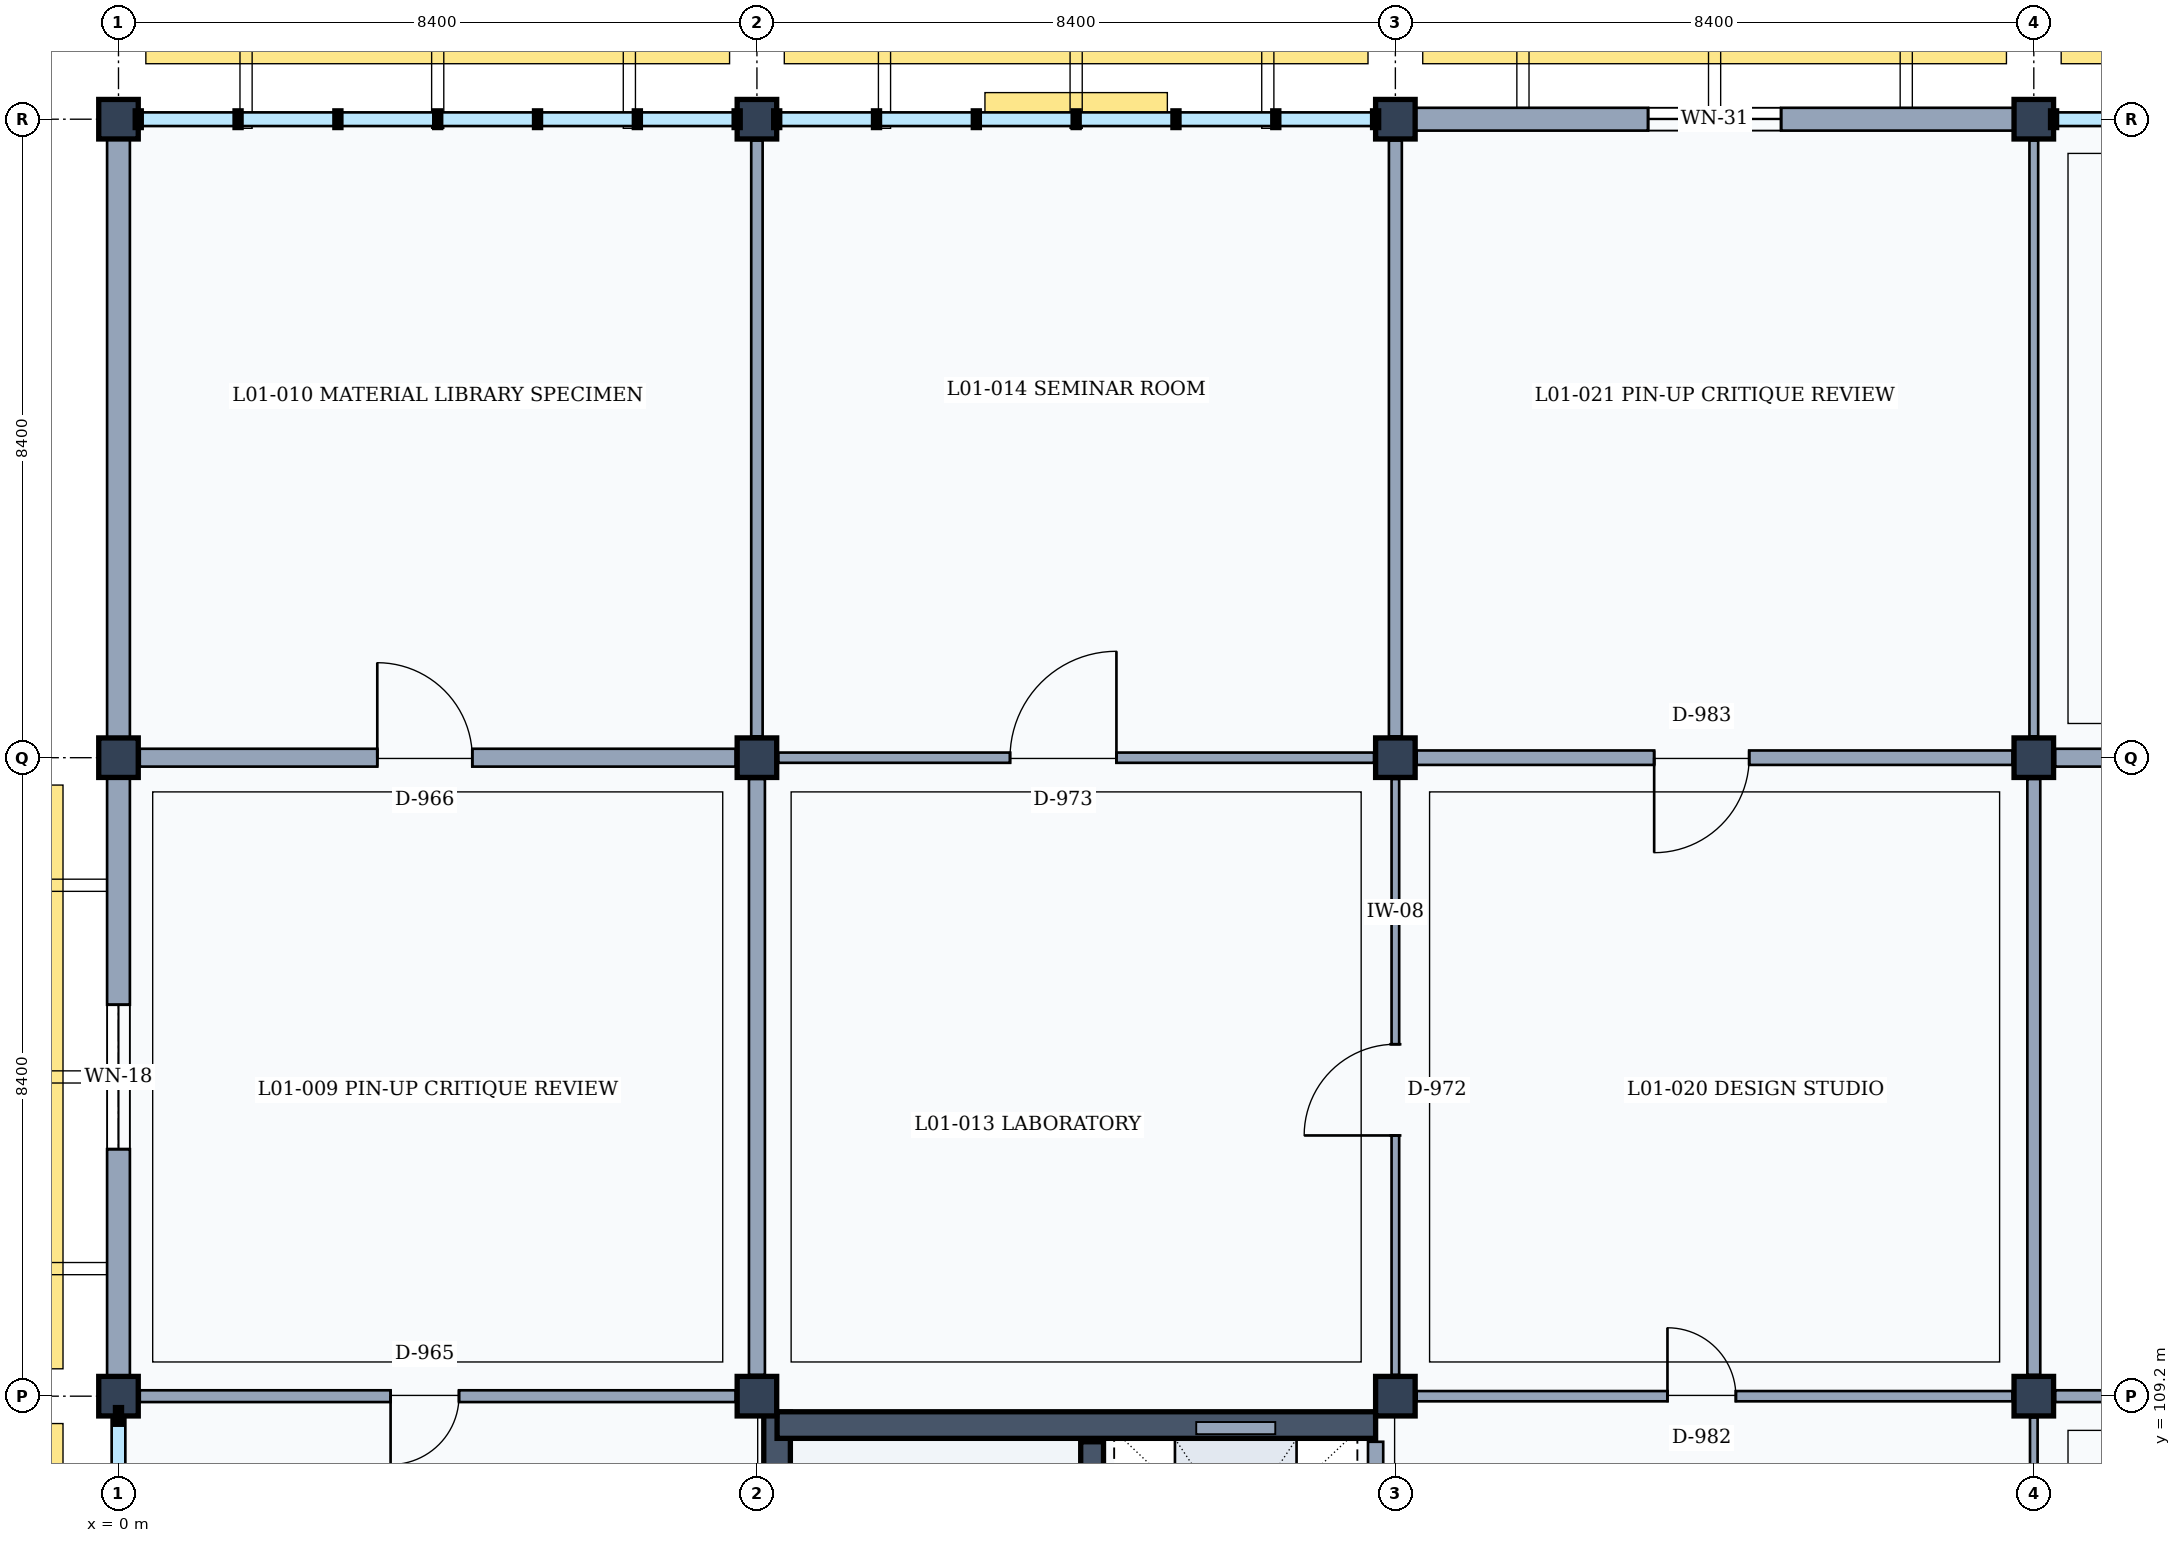
"""IFC4 building model, lengths in metres.
Left out: names, types, materials, properties, quantities, classifications, styles, units other than length and angle.
Written with IfcOpenShell. Run it as: python <this file> out.ifc"""

import sys

from ifc_helpers import new_model, si_unit, direction, frame, frame_2d, origin, origin_2d, place, context, subcontext, project, spatial, rectangle, extrude, element, fill, save


model = new_model("IFC4")
c1 = context("Model", 3, precision=1e-05, world=origin(), true_north=direction((0.0, 1.0)))
c2 = subcontext(c1, "Body", "Model", "MODEL_VIEW")
j1 = project(units=[si_unit("LENGTHUNIT", "METRE"), si_unit("PLANEANGLEUNIT", "RADIAN")], contexts=[c1])
p1 = place(None, origin())
s1 = spatial("IfcSite", under=j1, at=p1, CompositionType="ELEMENT")
p2 = place(p1, origin())
s2 = spatial("IfcBuilding", under=s1, at=p2, CompositionType="ELEMENT")
p3 = place(p2, frame((0.0, 0.0, 4.8)))
s3 = spatial("IfcBuildingStorey", under=s2, at=p3, CompositionType="ELEMENT", Elevation=4.8)
for number, where, z_axis, x_axis in (
    (1, (0.0, 109.2, 0.0), (0.0, 0.0, 1.0), (1.0, 0.0, 0.0)),
    (2, (0.0, 117.6, 0.0), (0.0, 0.0, 1.0), (1.0, 0.0, 0.0)),
    (3, (0.0, 126.0, 0.0), (0.0, 0.0, 1.0), (1.0, 0.0, 0.0)),
    (4, (8.4, 109.2, 0.0), (0.0, 0.0, 1.0), (1.0, 0.0, 0.0)),
    (5, (8.4, 117.6, 0.0), (0.0, 0.0, 1.0), (1.0, 0.0, 0.0)),
    (6, (8.4, 126.0, 0.0), (0.0, 0.0, 1.0), (1.0, 0.0, 0.0)),
    (7, (16.8, 109.2, 0.0), (0.0, 0.0, 1.0), (1.0, 0.0, 0.0)),
    (8, (16.8, 117.6, 0.0), (0.0, 0.0, 1.0), (1.0, 0.0, 0.0)),
    (9, (16.8, 126.0, 0.0), (0.0, 0.0, 1.0), (1.0, 0.0, 0.0)),
    (10, (25.2, 109.2, 0.0), (0.0, 0.0, 1.0), (1.0, 0.0, 0.0)),
    (11, (25.2, 117.6, 0.0), (0.0, 0.0, 1.0), (1.0, 0.0, 0.0)),
    (12, (25.2, 126.0, 0.0), (0.0, 0.0, 1.0), (1.0, 0.0, 0.0)),
):
    element("IfcColumn", number, at=place(p3, frame(where, z_axis=z_axis, x_axis=x_axis)), inside=s3, PredefinedType="COLUMN", context=c2, shape_type="SweptSolid", body=[
        extrude(rectangle(XDim=0.52, YDim=0.52, at=origin_2d()), origin(), (0.0, 0.0, 1.0), 4.8),
    ])
p4 = place(p3, frame((0.0, 109.46, 0.0), z_axis=(0.0, 0.0, 1.0), x_axis=(0.0, 1.0, 0.0)))
e13 = element("IfcWall", 13, at=p4, inside=s3, PredefinedType="SOLIDWALL", context=c2, shape_type="SweptSolid", body=[
    extrude(rectangle(XDim=7.88, YDim=0.3, at=frame_2d((3.94, 0.0))), origin(), (0.0, 0.0, 1.0), 3.96),
])
p5 = place(p4, frame((2.99, 0.0, 0.9)))
e14 = element("IfcOpeningElement", 14, at=p5, cuts=e13, PredefinedType="OPENING", context=c2, shape_type="SweptSolid", body=[
    extrude(rectangle(XDim=1.9, YDim=2.05, at=frame_2d((0.95, 1.025))), frame((0.0, 0.16, 0.0), z_axis=(0.0, -1.0, 0.0), x_axis=(1.0, 0.0, 0.0)), (0.0, 0.0, 1.0), 0.32),
])
p6 = place(p3, frame((0.0, 117.86, 0.0), z_axis=(0.0, 0.0, 1.0), x_axis=(0.0, 1.0, 0.0)))
e15 = element("IfcWall", 15, at=p6, inside=s3, PredefinedType="SOLIDWALL", context=c2, shape_type="SweptSolid", body=[
    extrude(rectangle(XDim=7.88, YDim=0.3, at=frame_2d((3.94, 0.0))), origin(), (0.0, 0.0, 1.0), 3.96),
])
p7 = place(p3, frame((17.06, 126.0, 0.0), z_axis=(0.0, 0.0, 1.0), x_axis=(1.0, 0.0, 0.0)))
e16 = element("IfcWall", 16, at=p7, inside=s3, PredefinedType="SOLIDWALL", context=c2, shape_type="SweptSolid", body=[
    extrude(rectangle(XDim=7.88, YDim=0.3, at=frame_2d((3.94, 0.0))), origin(), (0.0, 0.0, 1.0), 3.96),
])
p8 = place(p7, frame((3.065, 0.0, 0.9)))
e17 = element("IfcOpeningElement", 17, at=p8, cuts=e16, PredefinedType="OPENING", context=c2, shape_type="SweptSolid", body=[
    extrude(rectangle(XDim=1.75, YDim=1.85, at=frame_2d((0.875, 0.925))), frame((0.0, 0.16, 0.0), z_axis=(0.0, -1.0, 0.0), x_axis=(1.0, 0.0, 0.0)), (0.0, 0.0, 1.0), 0.32),
])
p9 = place(p3, frame((8.665, 101.05, 0.0), z_axis=(0.0, 0.0, 1.0), x_axis=(0.0, 1.0, 0.0)))
e18 = element("IfcWall", 18, at=p9, inside=s3, PredefinedType="SHEAR", context=c2, shape_type="SweptSolid", body=[
    extrude(rectangle(XDim=7.94, YDim=0.35, at=frame_2d((3.97, 0.0))), origin(), (0.0, 0.0, 1.0), 4.56),
])
p10 = place(p3, frame((8.665, 108.82, 0.0), z_axis=(0.0, 0.0, 1.0), x_axis=(1.0, 0.0, 0.0)))
e19 = element("IfcWall", 19, at=p10, inside=s3, PredefinedType="SHEAR", context=c2, shape_type="SweptSolid", body=[
    extrude(rectangle(XDim=7.875, YDim=0.35, at=frame_2d((3.938, 0.0))), origin(), (0.0, 0.0, 1.0), 4.56),
])
p11 = place(p3, frame((16.54, 108.6, 0.0), z_axis=(0.0, 0.0, 1.0), x_axis=(0.0, -1.0, 0.0)))
e20 = element("IfcWall", 20, at=p11, inside=s3, PredefinedType="PARTITIONING", context=c2, shape_type="SweptSolid", body=[
    extrude(rectangle(XDim=7.2, YDim=0.2, at=frame_2d((3.6, 0.0))), origin(), (0.0, 0.0, 1.0), 3.92),
])
p12 = place(p11, frame((3.55, 0.0, 0.0)))
e21 = element("IfcOpeningElement", 21, at=p12, cuts=e20, PredefinedType="OPENING", context=c2, shape_type="SweptSolid", body=[
    extrude(rectangle(XDim=1.1, YDim=2.15, at=frame_2d((0.55, 1.075))), frame((0.0, 0.11, 0.0), z_axis=(0.0, -1.0, 0.0), x_axis=(1.0, 0.0, 0.0)), (0.0, 0.0, 1.0), 0.22),
])
p13 = place(p3, frame((12.81, 101.22, 0.0), z_axis=(0.0, 0.0, 1.0), x_axis=(0.0, 1.0, 0.0)))
e22 = element("IfcWall", 22, at=p13, inside=s3, PredefinedType="SHEAR", context=c2, shape_type="SweptSolid", body=[
    extrude(rectangle(XDim=7.38, YDim=0.3, at=frame_2d((3.69, 0.0))), origin(), (0.0, 0.0, 1.0), 4.56),
])
p14 = place(p13, frame((0.28, 0.0, 0.0)))
e23 = element("IfcOpeningElement", 23, at=p14, cuts=e22, PredefinedType="OPENING", context=c2, shape_type="SweptSolid", body=[
    extrude(rectangle(XDim=1.1, YDim=2.15, at=frame_2d((0.55, 1.075))), frame((0.0, 0.16, 0.0), z_axis=(0.0, -1.0, 0.0), x_axis=(1.0, 0.0, 0.0)), (0.0, 0.0, 1.0), 0.32),
])
p15 = place(p3, frame((0.28, 109.2, 0.0), z_axis=(0.0, 0.0, 1.0), x_axis=(1.0, 0.0, 0.0)))
e24 = element("IfcWall", 24, at=p15, inside=s3, PredefinedType="PARTITIONING", context=c2, shape_type="SweptSolid", body=[
    extrude(rectangle(XDim=7.84, YDim=0.155, at=frame_2d((3.92, 0.0))), origin(), (0.0, 0.0, 1.0), 3.92),
])
p16 = place(p15, frame((3.3, 0.0, 0.0)))
e25 = element("IfcOpeningElement", 25, at=p16, cuts=e24, PredefinedType="OPENING", context=c2, shape_type="SweptSolid", body=[
    extrude(rectangle(XDim=0.9, YDim=2.1, at=frame_2d((0.45, 1.05))), frame((0.0, 0.087, 0.0), z_axis=(0.0, -1.0, 0.0), x_axis=(1.0, 0.0, 0.0)), (0.0, 0.0, 1.0), 0.175),
])
p17 = place(p3, frame((8.4, 109.48, 0.0), z_axis=(0.0, 0.0, 1.0), x_axis=(0.0, 1.0, 0.0)))
e26 = element("IfcWall", 26, at=p17, inside=s3, PredefinedType="PARTITIONING", context=c2, shape_type="SweptSolid", body=[
    extrude(rectangle(XDim=7.84, YDim=0.21, at=frame_2d((3.92, 0.0))), origin(), (0.0, 0.0, 1.0), 3.92),
])
p18 = place(p3, frame((0.28, 117.6, 0.0), z_axis=(0.0, 0.0, 1.0), x_axis=(1.0, 0.0, 0.0)))
e27 = element("IfcWall", 27, at=p18, inside=s3, PredefinedType="PARTITIONING", context=c2, shape_type="SweptSolid", body=[
    extrude(rectangle(XDim=7.84, YDim=0.235, at=frame_2d((3.92, 0.0))), origin(), (0.0, 0.0, 1.0), 3.92),
])
p19 = place(p18, frame((3.125, 0.0, 0.0)))
e28 = element("IfcOpeningElement", 28, at=p19, cuts=e27, PredefinedType="OPENING", context=c2, shape_type="SweptSolid", body=[
    extrude(rectangle(XDim=1.25, YDim=2.3, at=frame_2d((0.625, 1.15))), frame((0.0, 0.127, 0.0), z_axis=(0.0, -1.0, 0.0), x_axis=(1.0, 0.0, 0.0)), (0.0, 0.0, 1.0), 0.255),
])
p20 = place(p3, frame((8.4, 117.88, 0.0), z_axis=(0.0, 0.0, 1.0), x_axis=(0.0, 1.0, 0.0)))
e29 = element("IfcWall", 29, at=p20, inside=s3, PredefinedType="PARTITIONING", context=c2, shape_type="SweptSolid", body=[
    extrude(rectangle(XDim=7.84, YDim=0.15, at=frame_2d((3.92, 0.0))), origin(), (0.0, 0.0, 1.0), 3.92),
])
p21 = place(p3, frame((16.8, 109.48, 0.0), z_axis=(0.0, 0.0, 1.0), x_axis=(0.0, 1.0, 0.0)))
e30 = element("IfcWall", 30, at=p21, inside=s3, PredefinedType="MOVABLE", context=c2, shape_type="SweptSolid", body=[
    extrude(rectangle(XDim=7.84, YDim=0.1, at=frame_2d((3.92, 0.0))), origin(), (0.0, 0.0, 1.0), 3.92),
])
p22 = place(p21, frame((3.15, 0.0, 0.0)))
e31 = element("IfcOpeningElement", 31, at=p22, cuts=e30, PredefinedType="OPENING", context=c2, shape_type="SweptSolid", body=[
    extrude(rectangle(XDim=1.2, YDim=2.2, at=frame_2d((0.6, 1.1))), frame((0.0, 0.06, 0.0), z_axis=(0.0, -1.0, 0.0), x_axis=(1.0, 0.0, 0.0)), (0.0, 0.0, 1.0), 0.12),
])
p23 = place(p3, frame((8.68, 117.6, 0.0), z_axis=(0.0, 0.0, 1.0), x_axis=(1.0, 0.0, 0.0)))
e32 = element("IfcWall", 32, at=p23, inside=s3, PredefinedType="PARTITIONING", context=c2, shape_type="SweptSolid", body=[
    extrude(rectangle(XDim=7.84, YDim=0.135, at=frame_2d((3.92, 0.0))), origin(), (0.0, 0.0, 1.0), 3.92),
])
p24 = place(p23, frame((3.05, 0.0, 0.0)))
e33 = element("IfcOpeningElement", 33, at=p24, cuts=e32, PredefinedType="OPENING", context=c2, shape_type="SweptSolid", body=[
    extrude(rectangle(XDim=1.4, YDim=2.25, at=frame_2d((0.7, 1.125))), frame((0.0, 0.077, 0.0), z_axis=(0.0, -1.0, 0.0), x_axis=(1.0, 0.0, 0.0)), (0.0, 0.0, 1.0), 0.155),
])
p25 = place(p3, frame((16.8, 117.88, 0.0), z_axis=(0.0, 0.0, 1.0), x_axis=(0.0, 1.0, 0.0)))
e34 = element("IfcWall", 34, at=p25, inside=s3, PredefinedType="PARTITIONING", context=c2, shape_type="SweptSolid", body=[
    extrude(rectangle(XDim=7.84, YDim=0.17, at=frame_2d((3.92, 0.0))), origin(), (0.0, 0.0, 1.0), 3.92),
])
p26 = place(p3, frame((25.2, 101.08, 0.0), z_axis=(0.0, 0.0, 1.0), x_axis=(0.0, 1.0, 0.0)))
e35 = element("IfcWall", 35, at=p26, inside=s3, PredefinedType="MOVABLE", context=c2, shape_type="SweptSolid", body=[
    extrude(rectangle(XDim=7.84, YDim=0.1, at=frame_2d((3.92, 0.0))), origin(), (0.0, 0.0, 1.0), 3.92),
])
p27 = place(p26, frame((2.8, 0.0, 0.0)))
e36 = element("IfcOpeningElement", 36, at=p27, cuts=e35, PredefinedType="OPENING", context=c2, shape_type="SweptSolid", body=[
    extrude(rectangle(XDim=1.9, YDim=2.4, at=frame_2d((0.95, 1.2))), frame((0.0, 0.06, 0.0), z_axis=(0.0, -1.0, 0.0), x_axis=(1.0, 0.0, 0.0)), (0.0, 0.0, 1.0), 0.12),
])
p28 = place(p3, frame((17.08, 109.2, 0.0), z_axis=(0.0, 0.0, 1.0), x_axis=(1.0, 0.0, 0.0)))
e37 = element("IfcWall", 37, at=p28, inside=s3, PredefinedType="PARTITIONING", context=c2, shape_type="SweptSolid", body=[
    extrude(rectangle(XDim=7.84, YDim=0.135, at=frame_2d((3.92, 0.0))), origin(), (0.0, 0.0, 1.0), 3.92),
])
p29 = place(p28, frame((3.3, 0.0, 0.0)))
e38 = element("IfcOpeningElement", 38, at=p29, cuts=e37, PredefinedType="OPENING", context=c2, shape_type="SweptSolid", body=[
    extrude(rectangle(XDim=0.9, YDim=2.1, at=frame_2d((0.45, 1.05))), frame((0.0, 0.077, 0.0), z_axis=(0.0, -1.0, 0.0), x_axis=(1.0, 0.0, 0.0)), (0.0, 0.0, 1.0), 0.155),
])
p30 = place(p3, frame((25.2, 109.48, 0.0), z_axis=(0.0, 0.0, 1.0), x_axis=(0.0, 1.0, 0.0)))
e39 = element("IfcWall", 39, at=p30, inside=s3, PredefinedType="PARTITIONING", context=c2, shape_type="SweptSolid", body=[
    extrude(rectangle(XDim=7.84, YDim=0.17, at=frame_2d((3.92, 0.0))), origin(), (0.0, 0.0, 1.0), 3.92),
])
p31 = place(p3, frame((17.08, 117.6, 0.0), z_axis=(0.0, 0.0, 1.0), x_axis=(1.0, 0.0, 0.0)))
e40 = element("IfcWall", 40, at=p31, inside=s3, PredefinedType="PARTITIONING", context=c2, shape_type="SweptSolid", body=[
    extrude(rectangle(XDim=7.84, YDim=0.19, at=frame_2d((3.92, 0.0))), origin(), (0.0, 0.0, 1.0), 3.92),
])
p32 = place(p31, frame((3.125, 0.0, 0.0)))
e41 = element("IfcOpeningElement", 41, at=p32, cuts=e40, PredefinedType="OPENING", context=c2, shape_type="SweptSolid", body=[
    extrude(rectangle(XDim=1.25, YDim=2.3, at=frame_2d((0.625, 1.15))), frame((0.0, 0.105, 0.0), z_axis=(0.0, -1.0, 0.0), x_axis=(1.0, 0.0, 0.0)), (0.0, 0.0, 1.0), 0.21),
])
p33 = place(p3, frame((25.2, 117.88, 0.0), z_axis=(0.0, 0.0, 1.0), x_axis=(0.0, 1.0, 0.0)))
e42 = element("IfcWall", 42, at=p33, inside=s3, PredefinedType="PARTITIONING", context=c2, shape_type="SweptSolid", body=[
    extrude(rectangle(XDim=7.84, YDim=0.115, at=frame_2d((3.92, 0.0))), origin(), (0.0, 0.0, 1.0), 3.92),
])
p34 = place(p3, frame((25.48, 109.2, 0.0), z_axis=(0.0, 0.0, 1.0), x_axis=(1.0, 0.0, 0.0)))
e43 = element("IfcWall", 43, at=p34, inside=s3, PredefinedType="PARTITIONING", context=c2, shape_type="SweptSolid", body=[
    extrude(rectangle(XDim=7.86, YDim=0.155, at=frame_2d((3.93, 0.0))), origin(), (0.0, 0.0, 1.0), 3.89),
])
p35 = place(p34, frame((3.0, 0.0, 0.0)))
e44 = element("IfcOpeningElement", 44, at=p35, cuts=e43, PredefinedType="OPENING", context=c2, shape_type="SweptSolid", body=[
    extrude(rectangle(XDim=1.5, YDim=2.3, at=frame_2d((0.75, 1.15))), frame((0.0, 0.087, 0.0), z_axis=(0.0, -1.0, 0.0), x_axis=(1.0, 0.0, 0.0)), (0.0, 0.0, 1.0), 0.175),
])
p36 = place(p3, frame((25.48, 117.6, 0.0), z_axis=(0.0, 0.0, 1.0), x_axis=(1.0, 0.0, 0.0)))
e45 = element("IfcWall", 45, at=p36, inside=s3, PredefinedType="PARTITIONING", context=c2, shape_type="SweptSolid", body=[
    extrude(rectangle(XDim=7.85, YDim=0.235, at=frame_2d((3.925, 0.0))), origin(), (0.0, 0.0, 1.0), 3.89),
])
p37 = place(p36, frame((2.925, 0.0, 0.0)))
e46 = element("IfcOpeningElement", 46, at=p37, cuts=e45, PredefinedType="OPENING", context=c2, shape_type="SweptSolid", body=[
    extrude(rectangle(XDim=1.65, YDim=2.25, at=frame_2d((0.825, 1.125))), frame((0.0, 0.127, 0.0), z_axis=(0.0, -1.0, 0.0), x_axis=(1.0, 0.0, 0.0)), (0.0, 0.0, 1.0), 0.255),
])
p38 = place(p5, origin())
e47 = element("IfcWindow", 47, at=p38, inside=s3, PartitioningType="SINGLE_PANEL", PredefinedType="WINDOW", context=c2, shape_type="SweptSolid", body=[
    extrude(rectangle(XDim=1.9, YDim=2.05, at=frame_2d((0.95, 1.025))), frame((0.0, 0.03, 0.0), z_axis=(0.0, -1.0, 0.0), x_axis=(1.0, 0.0, 0.0)), (0.0, 0.0, 1.0), 0.06),
])
fill(e14, e47)
p39 = place(p8, origin())
e48 = element("IfcWindow", 48, at=p39, inside=s3, PartitioningType="SINGLE_PANEL", PredefinedType="WINDOW", context=c2, shape_type="SweptSolid", body=[
    extrude(rectangle(XDim=1.75, YDim=1.85, at=frame_2d((0.875, 0.925))), frame((0.0, 0.03, 0.0), z_axis=(0.0, -1.0, 0.0), x_axis=(1.0, 0.0, 0.0)), (0.0, 0.0, 1.0), 0.06),
])
fill(e17, e48)
p40 = place(p16, frame((0.9, 0.0, 0.0), z_axis=(0.0, 0.0, 1.0), x_axis=(-1.0, 0.0, 0.0)))
e49 = element("IfcDoor", 49, at=p40, inside=s3, OperationType="SINGLE_SWING_RIGHT", PredefinedType="DOOR", context=c2, shape_type="SweptSolid", body=[
    extrude(rectangle(XDim=0.9, YDim=2.1, at=frame_2d((0.45, 1.05))), frame((0.0, 0.025, 0.0), z_axis=(0.0, -1.0, 0.0), x_axis=(1.0, 0.0, 0.0)), (0.0, 0.0, 1.0), 0.05),
])
fill(e25, e49)
p41 = place(p19, origin())
e50 = element("IfcDoor", 50, at=p41, inside=s3, OperationType="SINGLE_SWING_LEFT", PredefinedType="DOOR", context=c2, shape_type="SweptSolid", body=[
    extrude(rectangle(XDim=1.25, YDim=2.3, at=frame_2d((0.625, 1.15))), frame((0.0, 0.025, 0.0), z_axis=(0.0, -1.0, 0.0), x_axis=(1.0, 0.0, 0.0)), (0.0, 0.0, 1.0), 0.05),
])
fill(e28, e50)
p42 = place(p22, origin())
e51 = element("IfcDoor", 51, at=p42, inside=s3, OperationType="SINGLE_SWING_LEFT", PredefinedType="DOOR", context=c2, shape_type="SweptSolid", body=[
    extrude(rectangle(XDim=1.2, YDim=2.2, at=frame_2d((0.6, 1.1))), frame((0.0, 0.025, 0.0), z_axis=(0.0, -1.0, 0.0), x_axis=(1.0, 0.0, 0.0)), (0.0, 0.0, 1.0), 0.05),
])
fill(e31, e51)
p43 = place(p24, origin())
e52 = element("IfcDoor", 52, at=p43, inside=s3, OperationType="SINGLE_SWING_RIGHT", PredefinedType="DOOR", context=c2, shape_type="SweptSolid", body=[
    extrude(rectangle(XDim=1.4, YDim=2.25, at=frame_2d((0.7, 1.125))), frame((0.0, 0.025, 0.0), z_axis=(0.0, -1.0, 0.0), x_axis=(1.0, 0.0, 0.0)), (0.0, 0.0, 1.0), 0.05),
])
fill(e33, e52)
p44 = place(p29, origin())
e53 = element("IfcDoor", 53, at=p44, inside=s3, OperationType="SINGLE_SWING_LEFT", PredefinedType="DOOR", context=c2, shape_type="SweptSolid", body=[
    extrude(rectangle(XDim=0.9, YDim=2.1, at=frame_2d((0.45, 1.05))), frame((0.0, 0.025, 0.0), z_axis=(0.0, -1.0, 0.0), x_axis=(1.0, 0.0, 0.0)), (0.0, 0.0, 1.0), 0.05),
])
fill(e38, e53)
p45 = place(p32, frame((1.25, 0.0, 0.0), z_axis=(0.0, 0.0, 1.0), x_axis=(-1.0, 0.0, 0.0)))
e54 = element("IfcDoor", 54, at=p45, inside=s3, OperationType="SINGLE_SWING_RIGHT", PredefinedType="DOOR", context=c2, shape_type="SweptSolid", body=[
    extrude(rectangle(XDim=1.25, YDim=2.3, at=frame_2d((0.625, 1.15))), frame((0.0, 0.025, 0.0), z_axis=(0.0, -1.0, 0.0), x_axis=(1.0, 0.0, 0.0)), (0.0, 0.0, 1.0), 0.05),
])
fill(e41, e54)
save(model, sys.argv[1])
